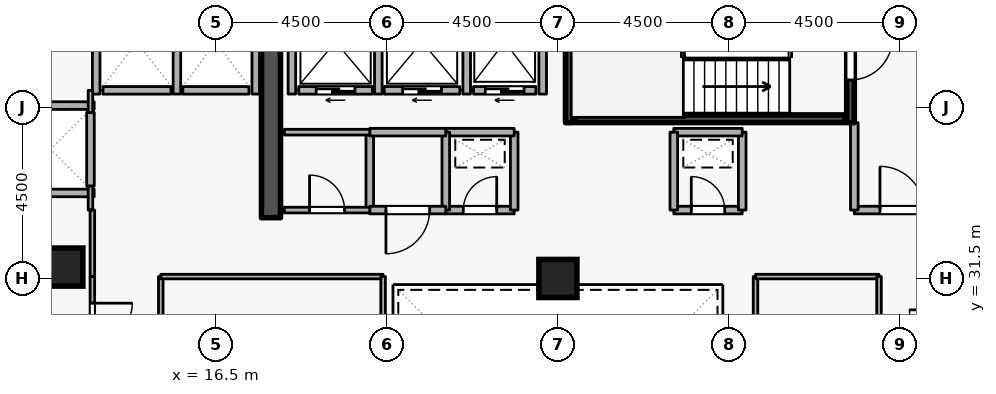
"""IFC4 building model, lengths in metres.
Left out: names, types, materials, properties, quantities, classifications, styles, units other than length and angle.
Written with IfcOpenShell. Run it as: python <this file> out.ifc"""

import sys

from ifc_helpers import new_model, si_unit, direction, frame, frame_2d, origin, origin_2d, place, context, subcontext, project, spatial, rectangle, extrude, element, fill, save


model = new_model("IFC4")
c1 = context("Model", 3, precision=1e-05, world=origin(), true_north=direction((0.0, 1.0)))
c2 = subcontext(c1, "Body", "Model", "MODEL_VIEW")
j1 = project(units=[si_unit("LENGTHUNIT", "METRE"), si_unit("PLANEANGLEUNIT", "RADIAN")], contexts=[c1])
p1 = place(None, origin())
s1 = spatial("IfcSite", under=j1, at=p1, CompositionType="ELEMENT")
p2 = place(p1, origin())
s2 = spatial("IfcBuilding", under=s1, at=p2, CompositionType="ELEMENT")
p3 = place(p2, frame((0.0, 0.0, 200.1)))
s3 = spatial("IfcBuildingStorey", under=s2, at=p3, CompositionType="ELEMENT", Elevation=200.1)
p4 = place(p3, frame((17.95, 33.1, 0.0), z_axis=(0.0, 0.0, 1.0), x_axis=(0.0, 1.0, 0.0)))
e1 = element("IfcWall", 1, at=p4, inside=s3, PredefinedType="SHEAR", context=c2, shape_type="SweptSolid", body=[
    extrude(rectangle(XDim=5.8, YDim=0.5, at=frame_2d((2.9, 0.0))), origin(), (0.0, 0.0, 1.0), 3.6),
])
for number, where, z_axis, x_axis in (
    (2, (12.5, 31.8, 0.0), (0.0, 0.0, 1.0), (1.0, 0.0, 0.0)),
    (3, (25.5, 31.5, 0.0), (0.0, 0.0, 1.0), (1.0, 0.0, 0.0)),
):
    element("IfcColumn", number, at=place(p3, frame(where, z_axis=z_axis, x_axis=x_axis)), inside=s3, PredefinedType="COLUMN", context=c2, shape_type="SweptSolid", body=[
        extrude(rectangle(XDim=1.0, YDim=1.0, at=origin_2d()), origin(), (0.0, 0.0, 1.0), 3.6),
    ])
p5 = place(p3, frame((24.92, 36.45, 0.0), z_axis=(0.0, 0.0, 1.0), x_axis=(-1.0, 0.0, 0.0)))
e4 = element("IfcWall", 4, at=p5, inside=s3, PredefinedType="STANDARD", context=c2, shape_type="SweptSolid", body=[
    extrude(rectangle(XDim=1.64, YDim=0.2, at=frame_2d((0.82, 0.0))), origin(), (0.0, 0.0, 1.0), 3.32),
])
p6 = place(p5, frame((0.31, 0.0, 0.0)))
e5 = element("IfcOpeningElement", 5, at=p6, cuts=e4, PredefinedType="OPENING", context=c2, shape_type="SweptSolid", body=[
    extrude(rectangle(XDim=1.02, YDim=2.06, at=frame_2d((0.51, 1.03))), frame((0.0, 0.11, 0.0), z_axis=(0.0, -1.0, 0.0), x_axis=(1.0, 0.0, 0.0)), (0.0, 0.0, 1.0), 0.22),
])
p7 = place(p3, frame((22.92, 36.45, 0.0), z_axis=(0.0, 0.0, 1.0), x_axis=(-1.0, 0.0, 0.0)))
e6 = element("IfcWall", 6, at=p7, inside=s3, PredefinedType="STANDARD", context=c2, shape_type="SweptSolid", body=[
    extrude(rectangle(XDim=1.99, YDim=0.2, at=frame_2d((0.995, 0.0))), origin(), (0.0, 0.0, 1.0), 3.32),
])
p8 = place(p7, frame((0.485, 0.0, 0.0)))
e7 = element("IfcOpeningElement", 7, at=p8, cuts=e6, PredefinedType="OPENING", context=c2, shape_type="SweptSolid", body=[
    extrude(rectangle(XDim=1.02, YDim=2.06, at=frame_2d((0.51, 1.03))), frame((0.0, 0.11, 0.0), z_axis=(0.0, -1.0, 0.0), x_axis=(1.0, 0.0, 0.0)), (0.0, 0.0, 1.0), 0.22),
])
p9 = place(p3, frame((20.62, 36.45, 0.0), z_axis=(0.0, 0.0, 1.0), x_axis=(-1.0, 0.0, 0.0)))
e8 = element("IfcWall", 8, at=p9, inside=s3, PredefinedType="STANDARD", context=c2, shape_type="SweptSolid", body=[
    extrude(rectangle(XDim=1.94, YDim=0.2, at=frame_2d((0.97, 0.0))), origin(), (0.0, 0.0, 1.0), 3.32),
])
p10 = place(p9, frame((0.46, 0.0, 0.0)))
e9 = element("IfcOpeningElement", 9, at=p10, cuts=e8, PredefinedType="OPENING", context=c2, shape_type="SweptSolid", body=[
    extrude(rectangle(XDim=1.02, YDim=2.06, at=frame_2d((0.51, 1.03))), frame((0.0, 0.11, 0.0), z_axis=(0.0, -1.0, 0.0), x_axis=(1.0, 0.0, 0.0)), (0.0, 0.0, 1.0), 0.22),
])
p11 = place(p3, frame((17.37, 36.45, 0.0), z_axis=(0.0, 0.0, 1.0), x_axis=(-1.0, 0.0, 0.0)))
e10 = element("IfcWall", 10, at=p11, inside=s3, PredefinedType="STANDARD", context=c2, shape_type="SweptSolid", body=[
    extrude(rectangle(XDim=1.74, YDim=0.2, at=frame_2d((0.87, 0.0))), origin(), (0.0, 0.0, 1.0), 3.32),
])
p12 = place(p3, frame((15.32, 36.45, 0.0), z_axis=(0.0, 0.0, 1.0), x_axis=(-1.0, 0.0, 0.0)))
e11 = element("IfcWall", 11, at=p12, inside=s3, PredefinedType="STANDARD", context=c2, shape_type="SweptSolid", body=[
    extrude(rectangle(XDim=1.79, YDim=0.2, at=frame_2d((0.895, 0.0))), origin(), (0.0, 0.0, 1.0), 3.32),
])
p13 = place(p3, frame((13.2, 33.93, 0.0), z_axis=(0.0, 0.0, 1.0), x_axis=(0.0, 1.0, 0.0)))
e12 = element("IfcWall", 12, at=p13, inside=s3, PredefinedType="STANDARD", context=c2, shape_type="SweptSolid", body=[
    extrude(rectangle(XDim=1.94, YDim=0.2, at=frame_2d((0.97, 0.0))), origin(), (0.0, 0.0, 1.0), 3.32),
])
for number, where, z_axis, x_axis in (
    (13, (25.1, 36.352, 0.0), (0.0, 0.0, 1.0), (0.0, 1.0, 0.0)),
    (14, (23.1, 36.352, 0.0), (0.0, 0.0, 1.0), (0.0, 1.0, 0.0)),
    (15, (20.775, 36.352, 0.0), (0.0, 0.0, 1.0), (0.0, 1.0, 0.0)),
    (16, (18.5, 36.352, 0.0), (0.0, 0.0, 1.0), (0.0, 1.0, 0.0)),
):
    element("IfcWall", number, at=place(p3, frame(where, z_axis=z_axis, x_axis=x_axis)), inside=s3, PredefinedType="STANDARD", context=c2, shape_type="SweptSolid", body=[
        extrude(rectangle(XDim=2.536, YDim=0.2, at=frame_2d((1.268, 0.0))), origin(), (0.0, 0.0, 1.0), 3.32),
    ])
p14 = place(p3, frame((17.55, 36.352, 0.0), z_axis=(0.0, 0.0, 1.0), x_axis=(0.0, 1.0, 0.0)))
e17 = element("IfcWall", 17, at=p14, inside=s3, PredefinedType="STANDARD", context=c2, shape_type="SweptSolid", body=[
    extrude(rectangle(XDim=2.636, YDim=0.2, at=frame_2d((1.318, 0.0))), origin(), (0.0, 0.0, 1.0), 2.525),
])
for number, where, z_axis, x_axis in (
    (18, (15.475, 36.352, 0.0), (0.0, 0.0, 1.0), (0.0, 1.0, 0.0)),
    (19, (13.35, 36.352, 0.0), (0.0, 0.0, 1.0), (0.0, 1.0, 0.0)),
):
    element("IfcWall", number, at=place(p3, frame(where, z_axis=z_axis, x_axis=x_axis)), inside=s3, PredefinedType="STANDARD", context=c2, shape_type="SweptSolid", body=[
        extrude(rectangle(XDim=2.636, YDim=0.2, at=frame_2d((1.318, 0.0))), origin(), (0.0, 0.0, 1.0), 3.32),
    ])
for number, where, z_axis, x_axis in (
    (20, (11.002, 36.05, 0.0), (0.0, 0.0, 1.0), (1.0, 0.0, 0.0)),
    (21, (11.002, 33.75, 0.0), (0.0, 0.0, 1.0), (1.0, 0.0, 0.0)),
):
    element("IfcWall", number, at=place(p3, frame(where, z_axis=z_axis, x_axis=x_axis)), inside=s3, PredefinedType="STANDARD", context=c2, shape_type="SweptSolid", body=[
        extrude(rectangle(XDim=2.296, YDim=0.2, at=frame_2d((1.148, 0.0))), origin(), (0.0, 0.0, 1.0), 3.32),
    ])
p15 = place(p3, frame((33.2, 38.95, 0.0), z_axis=(0.0, 0.0, 1.0), x_axis=(0.0, -1.0, 0.0)))
e22 = element("IfcWall", 22, at=p15, inside=s3, PredefinedType="SHEAR", context=c2, shape_type="SweptSolid", body=[
    extrude(rectangle(XDim=3.35, YDim=0.2, at=frame_2d((1.675, 0.0))), origin(), (0.0, 0.0, 1.0), 3.6),
])
p16 = place(p15, frame((1.125, 0.0, 0.0)))
e23 = element("IfcOpeningElement", 23, at=p16, cuts=e22, PredefinedType="OPENING", context=c2, shape_type="SweptSolid", body=[
    extrude(rectangle(XDim=1.1, YDim=2.1, at=frame_2d((0.55, 1.05))), frame((0.0, 0.11, 0.0), z_axis=(0.0, -1.0, 0.0), x_axis=(1.0, 0.0, 0.0)), (0.0, 0.0, 1.0), 0.22),
])
p17 = place(p3, frame((25.8, 35.6, 0.0), z_axis=(0.0, 0.0, 1.0), x_axis=(0.0, 1.0, 0.0)))
e24 = element("IfcWall", 24, at=p17, inside=s3, PredefinedType="SHEAR", context=c2, shape_type="SweptSolid", body=[
    extrude(rectangle(XDim=3.35, YDim=0.2, at=frame_2d((1.675, 0.0))), origin(), (0.0, 0.0, 1.0), 3.6),
])
p18 = place(p3, frame((25.95, 35.703, 0.0), z_axis=(0.0, 0.0, 1.0), x_axis=(1.0, 0.0, 0.0)))
e25 = element("IfcWall", 25, at=p18, inside=s3, PredefinedType="SHEAR", context=c2, shape_type="SweptSolid", body=[
    extrude(rectangle(XDim=7.1, YDim=0.2, at=frame_2d((3.55, 0.0))), origin(), (0.0, 0.0, 1.0), 3.6),
])
p19 = place(p3, frame((33.3, 33.3, 0.0), z_axis=(0.0, 0.0, 1.0), x_axis=(1.0, 0.0, 0.0)))
e26 = element("IfcWall", 26, at=p19, inside=s3, PredefinedType="STANDARD", context=c2, shape_type="SweptSolid", body=[
    extrude(rectangle(XDim=2.5, YDim=0.2, at=frame_2d((1.25, 0.0))), origin(), (0.0, 0.0, 1.0), 3.32),
])
p20 = place(p19, frame((0.675, 0.0, 0.0)))
e27 = element("IfcOpeningElement", 27, at=p20, cuts=e26, PredefinedType="OPENING", context=c2, shape_type="SweptSolid", body=[
    extrude(rectangle(XDim=1.15, YDim=2.1, at=frame_2d((0.575, 1.05))), frame((0.0, 0.11, 0.0), z_axis=(0.0, -1.0, 0.0), x_axis=(1.0, 0.0, 0.0)), (0.0, 0.0, 1.0), 0.22),
])
p21 = place(p3, frame((33.3, 35.6, 0.0), z_axis=(0.0, 0.0, 1.0), x_axis=(0.0, -1.0, 0.0)))
e28 = element("IfcWall", 28, at=p21, inside=s3, PredefinedType="STANDARD", context=c2, shape_type="SweptSolid", body=[
    extrude(rectangle(XDim=2.3, YDim=0.2, at=frame_2d((1.15, 0.0))), origin(), (0.0, 0.0, 1.0), 2.525),
])
p22 = place(p3, frame((22.55, 33.3, 0.0), z_axis=(0.0, 0.0, 1.0), x_axis=(1.0, 0.0, 0.0)))
e29 = element("IfcWall", 29, at=p22, inside=s3, PredefinedType="STANDARD", context=c2, shape_type="SweptSolid", body=[
    extrude(rectangle(XDim=1.8, YDim=0.2, at=frame_2d((0.9, 0.0))), origin(), (0.0, 0.0, 1.0), 3.32),
])
p23 = place(p22, frame((0.46, 0.0, 0.0)))
e30 = element("IfcOpeningElement", 30, at=p23, cuts=e29, PredefinedType="OPENING", context=c2, shape_type="SweptSolid", body=[
    extrude(rectangle(XDim=0.88, YDim=2.04, at=frame_2d((0.44, 1.02))), frame((0.0, 0.11, 0.0), z_axis=(0.0, -1.0, 0.0), x_axis=(1.0, 0.0, 0.0)), (0.0, 0.0, 1.0), 0.22),
])
p24 = place(p3, frame((24.35, 33.3, 0.0), z_axis=(0.0, 0.0, 1.0), x_axis=(0.0, 1.0, 0.0)))
e31 = element("IfcWall", 31, at=p24, inside=s3, PredefinedType="STANDARD", context=c2, shape_type="SweptSolid", body=[
    extrude(rectangle(XDim=2.05, YDim=0.2, at=frame_2d((1.025, 0.0))), origin(), (0.0, 0.0, 1.0), 3.32),
])
p25 = place(p3, frame((24.35, 35.35, 0.0), z_axis=(0.0, 0.0, 1.0), x_axis=(-1.0, 0.0, 0.0)))
e32 = element("IfcWall", 32, at=p25, inside=s3, PredefinedType="STANDARD", context=c2, shape_type="SweptSolid", body=[
    extrude(rectangle(XDim=1.8, YDim=0.2, at=frame_2d((0.9, 0.0))), origin(), (0.0, 0.0, 1.0), 3.32),
])
p26 = place(p3, frame((22.55, 35.35, 0.0), z_axis=(0.0, 0.0, 1.0), x_axis=(0.0, -1.0, 0.0)))
e33 = element("IfcWall", 33, at=p26, inside=s3, PredefinedType="STANDARD", context=c2, shape_type="SweptSolid", body=[
    extrude(rectangle(XDim=2.05, YDim=0.2, at=frame_2d((1.025, 0.0))), origin(), (0.0, 0.0, 1.0), 3.32),
])
p27 = place(p3, frame((28.55, 33.3, 0.0), z_axis=(0.0, 0.0, 1.0), x_axis=(1.0, 0.0, 0.0)))
e34 = element("IfcWall", 34, at=p27, inside=s3, PredefinedType="STANDARD", context=c2, shape_type="SweptSolid", body=[
    extrude(rectangle(XDim=1.8, YDim=0.2, at=frame_2d((0.9, 0.0))), origin(), (0.0, 0.0, 1.0), 3.32),
])
p28 = place(p27, frame((0.46, 0.0, 0.0)))
e35 = element("IfcOpeningElement", 35, at=p28, cuts=e34, PredefinedType="OPENING", context=c2, shape_type="SweptSolid", body=[
    extrude(rectangle(XDim=0.88, YDim=2.04, at=frame_2d((0.44, 1.02))), frame((0.0, 0.11, 0.0), z_axis=(0.0, -1.0, 0.0), x_axis=(1.0, 0.0, 0.0)), (0.0, 0.0, 1.0), 0.22),
])
p29 = place(p3, frame((30.35, 33.3, 0.0), z_axis=(0.0, 0.0, 1.0), x_axis=(0.0, 1.0, 0.0)))
e36 = element("IfcWall", 36, at=p29, inside=s3, PredefinedType="STANDARD", context=c2, shape_type="SweptSolid", body=[
    extrude(rectangle(XDim=2.05, YDim=0.2, at=frame_2d((1.025, 0.0))), origin(), (0.0, 0.0, 1.0), 3.32),
])
p30 = place(p3, frame((30.35, 35.35, 0.0), z_axis=(0.0, 0.0, 1.0), x_axis=(-1.0, 0.0, 0.0)))
e37 = element("IfcWall", 37, at=p30, inside=s3, PredefinedType="STANDARD", context=c2, shape_type="SweptSolid", body=[
    extrude(rectangle(XDim=1.8, YDim=0.2, at=frame_2d((0.9, 0.0))), origin(), (0.0, 0.0, 1.0), 3.32),
])
for number, where, z_axis, x_axis in (
    (38, (28.55, 35.35, 0.0), (0.0, 0.0, 1.0), (0.0, -1.0, 0.0)),
    (39, (20.55, 33.3, 0.0), (0.0, 0.0, 1.0), (0.0, 1.0, 0.0)),
):
    element("IfcWall", number, at=place(p3, frame(where, z_axis=z_axis, x_axis=x_axis)), inside=s3, PredefinedType="STANDARD", context=c2, shape_type="SweptSolid", body=[
        extrude(rectangle(XDim=2.05, YDim=0.2, at=frame_2d((1.025, 0.0))), origin(), (0.0, 0.0, 1.0), 3.32),
    ])
p31 = place(p3, frame((20.55, 35.35, 0.0), z_axis=(0.0, 0.0, 1.0), x_axis=(1.0, 0.0, 0.0)))
e40 = element("IfcWall", 40, at=p31, inside=s3, PredefinedType="STANDARD", context=c2, shape_type="SweptSolid", body=[
    extrude(rectangle(XDim=2.0, YDim=0.2, at=frame_2d((1.0, 0.0))), origin(), (0.0, 0.0, 1.0), 3.32),
])
p32 = place(p3, frame((22.55, 33.3, 0.0), z_axis=(0.0, 0.0, 1.0), x_axis=(-1.0, 0.0, 0.0)))
e41 = element("IfcWall", 41, at=p32, inside=s3, PredefinedType="STANDARD", context=c2, shape_type="SweptSolid", body=[
    extrude(rectangle(XDim=2.0, YDim=0.2, at=frame_2d((1.0, 0.0))), origin(), (0.0, 0.0, 1.0), 3.32),
])
p33 = place(p32, frame((0.425, 0.0, 0.0)))
e42 = element("IfcOpeningElement", 42, at=p33, cuts=e41, PredefinedType="OPENING", context=c2, shape_type="SweptSolid", body=[
    extrude(rectangle(XDim=1.15, YDim=2.1, at=frame_2d((0.575, 1.05))), frame((0.0, 0.11, 0.0), z_axis=(0.0, -1.0, 0.0), x_axis=(1.0, 0.0, 0.0)), (0.0, 0.0, 1.0), 0.22),
])
p34 = place(p3, frame((18.3, 33.3, 0.0), z_axis=(0.0, 0.0, 1.0), x_axis=(1.0, 0.0, 0.0)))
e43 = element("IfcWall", 43, at=p34, inside=s3, PredefinedType="PARTITIONING", context=c2, shape_type="SweptSolid", body=[
    extrude(rectangle(XDim=2.25, YDim=0.15, at=frame_2d((1.125, 0.0))), origin(), (0.0, 0.0, 1.0), 3.32),
])
p35 = place(p34, frame((0.665, 0.0, 0.0)))
e44 = element("IfcOpeningElement", 44, at=p35, cuts=e43, PredefinedType="OPENING", context=c2, shape_type="SweptSolid", body=[
    extrude(rectangle(XDim=0.92, YDim=2.08, at=frame_2d((0.46, 1.04))), frame((0.0, 0.085, 0.0), z_axis=(0.0, -1.0, 0.0), x_axis=(1.0, 0.0, 0.0)), (0.0, 0.0, 1.0), 0.17),
])
p36 = place(p3, frame((20.55, 35.35, 0.0), z_axis=(0.0, 0.0, 1.0), x_axis=(-1.0, 0.0, 0.0)))
e45 = element("IfcWall", 45, at=p36, inside=s3, PredefinedType="PARTITIONING", context=c2, shape_type="SweptSolid", body=[
    extrude(rectangle(XDim=2.25, YDim=0.15, at=frame_2d((1.125, 0.0))), origin(), (0.0, 0.0, 1.0), 3.32),
])
p37 = place(p3, frame((13.2, 36.45, 0.0), z_axis=(0.0, 0.0, 1.0), x_axis=(0.0, -1.0, 0.0)))
e46 = element("IfcWall", 46, at=p37, inside=s3, PredefinedType="PARTITIONING", context=c2, shape_type="SweptSolid", body=[
    extrude(rectangle(XDim=0.58, YDim=0.12, at=frame_2d((0.29, 0.0))), origin(), (0.0, 0.0, 1.0), 3.32),
])
p38 = place(p3, frame((13.2, 33.93, 0.0), z_axis=(0.0, 0.0, 1.0), x_axis=(0.0, -1.0, 0.0)))
e47 = element("IfcWall", 47, at=p38, inside=s3, PredefinedType="PARTITIONING", context=c2, shape_type="SweptSolid", body=[
    extrude(rectangle(XDim=0.63, YDim=0.12, at=frame_2d((0.315, 0.0))), origin(), (0.0, 0.0, 1.0), 3.32),
])
p39 = place(p3, frame((13.25, 33.3, 0.0), z_axis=(0.0, 0.0, 1.0), x_axis=(0.0, -1.0, 0.0)))
e48 = element("IfcWall", 48, at=p39, inside=s3, PredefinedType="PARTITIONING", context=c2, shape_type="SweptSolid", body=[
    extrude(rectangle(XDim=1.75, YDim=0.12, at=frame_2d((0.875, 0.0))), origin(), (0.0, 0.0, 1.0), 3.32),
])
p40 = place(p3, frame((13.25, 31.55, 0.0), z_axis=(0.0, 0.0, 1.0), x_axis=(0.0, -1.0, 0.0)))
e49 = element("IfcWall", 49, at=p40, inside=s3, PredefinedType="PARTITIONING", context=c2, shape_type="SweptSolid", body=[
    extrude(rectangle(XDim=2.45, YDim=0.12, at=frame_2d((1.225, 0.0))), origin(), (0.0, 0.0, 1.0), 3.32),
])
p41 = place(p40, frame((0.7, 0.0, 0.0)))
e50 = element("IfcOpeningElement", 50, at=p41, cuts=e49, PredefinedType="OPENING", context=c2, shape_type="SweptSolid", body=[
    extrude(rectangle(XDim=1.05, YDim=2.1, at=frame_2d((0.525, 1.05))), frame((0.0, 0.07, 0.0), z_axis=(0.0, -1.0, 0.0), x_axis=(1.0, 0.0, 0.0)), (0.0, 0.0, 1.0), 0.14),
])
p42 = place(p3, frame((15.05, 22.45, 0.0), z_axis=(0.0, 0.0, 1.0), x_axis=(0.0, 1.0, 0.0)))
e51 = element("IfcWall", 51, at=p42, inside=s3, PredefinedType="PARTITIONING", context=c2, shape_type="SweptSolid", body=[
    extrude(rectangle(XDim=9.1, YDim=0.12, at=frame_2d((4.55, 0.0))), origin(), (0.0, 0.0, 1.0), 3.32),
])
p43 = place(p42, frame((4.075, 0.0, 0.0)))
e52 = element("IfcOpeningElement", 52, at=p43, cuts=e51, PredefinedType="OPENING", context=c2, shape_type="SweptSolid", body=[
    extrude(rectangle(XDim=0.95, YDim=2.1, at=frame_2d((0.475, 1.05))), frame((0.0, 0.07, 0.0), z_axis=(0.0, -1.0, 0.0), x_axis=(1.0, 0.0, 0.0)), (0.0, 0.0, 1.0), 0.14),
])
p44 = place(p3, frame((15.05, 31.55, 0.0), z_axis=(0.0, 0.0, 1.0), x_axis=(1.0, 0.0, 0.0)))
e53 = element("IfcWall", 53, at=p44, inside=s3, PredefinedType="PARTITIONING", context=c2, shape_type="SweptSolid", body=[
    extrude(rectangle(XDim=5.85, YDim=0.12, at=frame_2d((2.925, 0.0))), origin(), (0.0, 0.0, 1.0), 3.32),
])
for number, where, z_axis, x_axis in (
    (54, (20.9, 31.55, 0.0), (0.0, 0.0, 1.0), (0.0, -1.0, 0.0)),
    (55, (30.7, 22.45, 0.0), (0.0, 0.0, 1.0), (0.0, 1.0, 0.0)),
):
    element("IfcWall", number, at=place(p3, frame(where, z_axis=z_axis, x_axis=x_axis)), inside=s3, PredefinedType="PARTITIONING", context=c2, shape_type="SweptSolid", body=[
        extrude(rectangle(XDim=9.1, YDim=0.12, at=frame_2d((4.55, 0.0))), origin(), (0.0, 0.0, 1.0), 3.32),
    ])
p45 = place(p3, frame((30.7, 31.55, 0.0), z_axis=(0.0, 0.0, 1.0), x_axis=(1.0, 0.0, 0.0)))
e56 = element("IfcWall", 56, at=p45, inside=s3, PredefinedType="PARTITIONING", context=c2, shape_type="SweptSolid", body=[
    extrude(rectangle(XDim=3.25, YDim=0.12, at=frame_2d((1.625, 0.0))), origin(), (0.0, 0.0, 1.0), 3.32),
])
p46 = place(p3, frame((33.95, 31.55, 0.0), z_axis=(0.0, 0.0, 1.0), x_axis=(0.0, -1.0, 0.0)))
e57 = element("IfcWall", 57, at=p46, inside=s3, PredefinedType="PARTITIONING", context=c2, shape_type="SweptSolid", body=[
    extrude(rectangle(XDim=9.1, YDim=0.12, at=frame_2d((4.55, 0.0))), origin(), (0.0, 0.0, 1.0), 3.32),
])
p47 = place(p46, frame((4.075, 0.0, 0.0)))
e58 = element("IfcOpeningElement", 58, at=p47, cuts=e57, PredefinedType="OPENING", context=c2, shape_type="SweptSolid", body=[
    extrude(rectangle(XDim=0.95, YDim=2.1, at=frame_2d((0.475, 1.05))), frame((0.0, 0.07, 0.0), z_axis=(0.0, -1.0, 0.0), x_axis=(1.0, 0.0, 0.0)), (0.0, 0.0, 1.0), 0.14),
])
p48 = place(p6, origin())
e59 = element("IfcDoor", 59, at=p48, inside=s3, OperationType="SLIDING_TO_LEFT", PredefinedType="DOOR", context=c2, shape_type="SweptSolid", body=[
    extrude(rectangle(XDim=1.02, YDim=2.06, at=frame_2d((0.51, 1.03))), frame((0.0, 0.025, 0.0), z_axis=(0.0, -1.0, 0.0), x_axis=(1.0, 0.0, 0.0)), (0.0, 0.0, 1.0), 0.05),
])
fill(e5, e59)
p49 = place(p8, origin())
e60 = element("IfcDoor", 60, at=p49, inside=s3, OperationType="SLIDING_TO_LEFT", PredefinedType="DOOR", context=c2, shape_type="SweptSolid", body=[
    extrude(rectangle(XDim=1.02, YDim=2.06, at=frame_2d((0.51, 1.03))), frame((0.0, 0.025, 0.0), z_axis=(0.0, -1.0, 0.0), x_axis=(1.0, 0.0, 0.0)), (0.0, 0.0, 1.0), 0.05),
])
fill(e7, e60)
p50 = place(p10, origin())
e61 = element("IfcDoor", 61, at=p50, inside=s3, OperationType="SLIDING_TO_LEFT", PredefinedType="DOOR", context=c2, shape_type="SweptSolid", body=[
    extrude(rectangle(XDim=1.02, YDim=2.06, at=frame_2d((0.51, 1.03))), frame((0.0, 0.025, 0.0), z_axis=(0.0, -1.0, 0.0), x_axis=(1.0, 0.0, 0.0)), (0.0, 0.0, 1.0), 0.05),
])
fill(e9, e61)
p51 = place(p16, origin())
e62 = element("IfcDoor", 62, at=p51, inside=s3, OperationType="SINGLE_SWING_LEFT", PredefinedType="DOOR", context=c2, shape_type="SweptSolid", body=[
    extrude(rectangle(XDim=1.1, YDim=2.1, at=frame_2d((0.55, 1.05))), frame((0.0, 0.025, 0.0), z_axis=(0.0, -1.0, 0.0), x_axis=(1.0, 0.0, 0.0)), (0.0, 0.0, 1.0), 0.05),
])
fill(e23, e62)
p52 = place(p20, origin())
e63 = element("IfcDoor", 63, at=p52, inside=s3, OperationType="SINGLE_SWING_LEFT", PredefinedType="DOOR", context=c2, shape_type="SweptSolid", body=[
    extrude(rectangle(XDim=1.15, YDim=2.1, at=frame_2d((0.575, 1.05))), frame((0.0, 0.025, 0.0), z_axis=(0.0, -1.0, 0.0), x_axis=(1.0, 0.0, 0.0)), (0.0, 0.0, 1.0), 0.05),
])
fill(e27, e63)
p53 = place(p23, origin())
e64 = element("IfcDoor", 64, at=p53, inside=s3, OperationType="SINGLE_SWING_RIGHT", PredefinedType="DOOR", context=c2, shape_type="SweptSolid", body=[
    extrude(rectangle(XDim=0.88, YDim=2.04, at=frame_2d((0.44, 1.02))), frame((0.0, 0.025, 0.0), z_axis=(0.0, -1.0, 0.0), x_axis=(1.0, 0.0, 0.0)), (0.0, 0.0, 1.0), 0.05),
])
fill(e30, e64)
p54 = place(p28, origin())
e65 = element("IfcDoor", 65, at=p54, inside=s3, OperationType="SINGLE_SWING_LEFT", PredefinedType="DOOR", context=c2, shape_type="SweptSolid", body=[
    extrude(rectangle(XDim=0.88, YDim=2.04, at=frame_2d((0.44, 1.02))), frame((0.0, 0.025, 0.0), z_axis=(0.0, -1.0, 0.0), x_axis=(1.0, 0.0, 0.0)), (0.0, 0.0, 1.0), 0.05),
])
fill(e35, e65)
p55 = place(p35, origin())
e66 = element("IfcDoor", 66, at=p55, inside=s3, OperationType="SINGLE_SWING_LEFT", PredefinedType="DOOR", context=c2, shape_type="SweptSolid", body=[
    extrude(rectangle(XDim=0.92, YDim=2.08, at=frame_2d((0.46, 1.04))), frame((0.0, 0.025, 0.0), z_axis=(0.0, -1.0, 0.0), x_axis=(1.0, 0.0, 0.0)), (0.0, 0.0, 1.0), 0.05),
])
fill(e44, e66)
p56 = place(p33, origin())
e67 = element("IfcDoor", 67, at=p56, inside=s3, OperationType="SINGLE_SWING_RIGHT", PredefinedType="DOOR", context=c2, shape_type="SweptSolid", body=[
    extrude(rectangle(XDim=1.15, YDim=2.1, at=frame_2d((0.575, 1.05))), frame((0.0, 0.025, 0.0), z_axis=(0.0, -1.0, 0.0), x_axis=(1.0, 0.0, 0.0)), (0.0, 0.0, 1.0), 0.05),
])
fill(e42, e67)
p57 = place(p41, origin())
e68 = element("IfcDoor", 68, at=p57, inside=s3, OperationType="SINGLE_SWING_LEFT", PredefinedType="DOOR", context=c2, shape_type="SweptSolid", body=[
    extrude(rectangle(XDim=1.05, YDim=2.1, at=frame_2d((0.525, 1.05))), frame((0.0, 0.025, 0.0), z_axis=(0.0, -1.0, 0.0), x_axis=(1.0, 0.0, 0.0)), (0.0, 0.0, 1.0), 0.05),
])
fill(e50, e68)
save(model, sys.argv[1])
